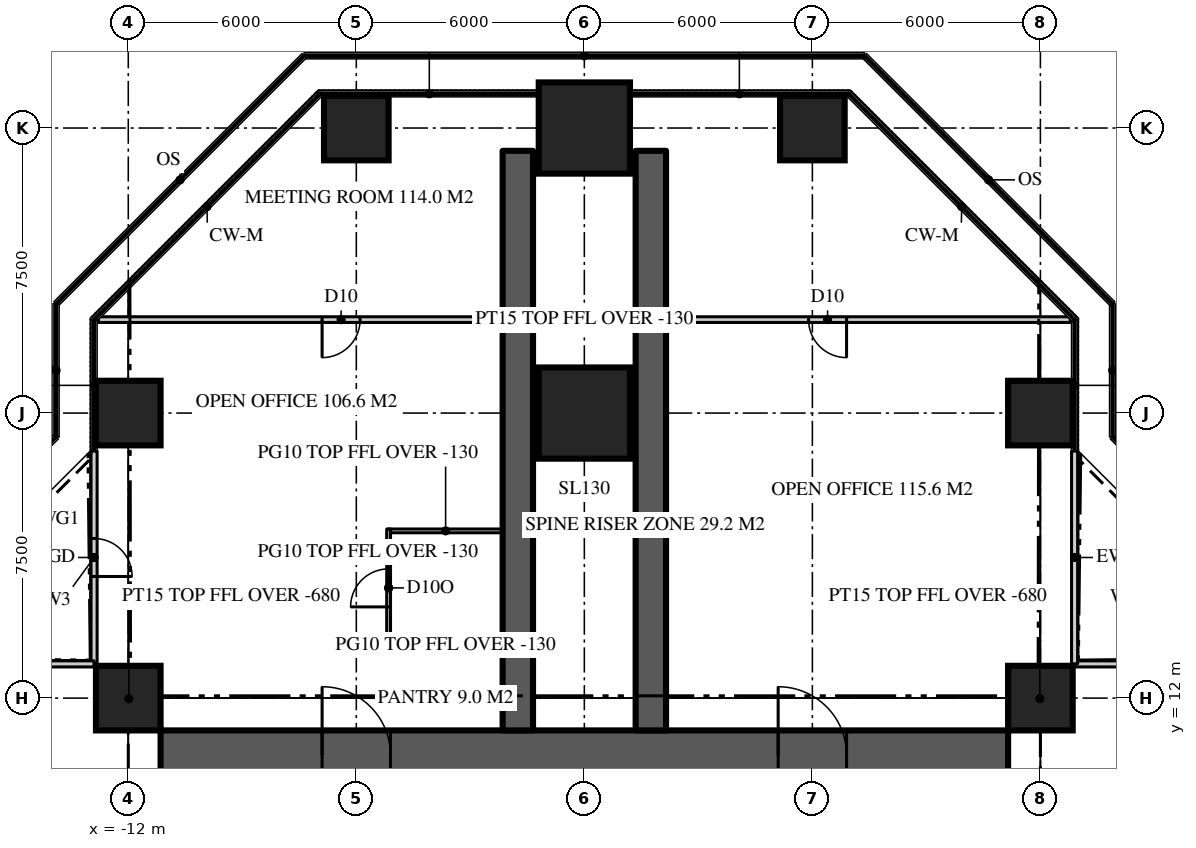
"""IFC4 building model, lengths in metres.
Left out: names, types, materials, properties, quantities, classifications, styles, units other than length and angle.
Written with IfcOpenShell. Run it as: python <this file> out.ifc"""

import sys

from ifc_helpers import new_model, si_unit, direction, frame, frame_2d, origin, origin_2d, place, context, subcontext, project, spatial, rectangle, extrude, element, fill, save


model = new_model("IFC4")
c1 = context("Model", 3, precision=1e-05, world=origin(), true_north=direction((0.0, 1.0)))
c2 = subcontext(c1, "Body", "Model", "MODEL_VIEW")
j1 = project(units=[si_unit("LENGTHUNIT", "METRE"), si_unit("PLANEANGLEUNIT", "RADIAN")], contexts=[c1])
p1 = place(None, origin())
s1 = spatial("IfcSite", under=j1, at=p1, CompositionType="ELEMENT")
p2 = place(p1, origin())
s2 = spatial("IfcBuilding", under=s1, at=p2, CompositionType="ELEMENT")
p3 = place(p2, frame((0.0, 0.0, 159.3)))
s3 = spatial("IfcBuildingStorey", under=s2, at=p3, CompositionType="ELEMENT", Elevation=159.3)
p4 = place(p3, frame((-11.15, 10.5, 0.0), z_axis=(0.0, 0.0, 1.0), x_axis=(1.0, 0.0, 0.0)))
e1 = element("IfcWall", 1, at=p4, inside=s3, PredefinedType="SHEAR", context=c2, shape_type="SweptSolid", body=[
    extrude(rectangle(XDim=22.3, YDim=1.3, at=frame_2d((11.15, 0.0))), origin(), (0.0, 0.0, 1.0), 3.9),
])
p5 = place(p4, frame((4.25, 0.0, 0.0)))
e2 = element("IfcOpeningElement", 2, at=p5, cuts=e1, PredefinedType="OPENING", context=c2, shape_type="SweptSolid", body=[
    extrude(rectangle(XDim=1.8, YDim=2.2, at=frame_2d((0.9, 1.1))), frame((0.0, 0.66, 0.0), z_axis=(0.0, -1.0, 0.0), x_axis=(1.0, 0.0, 0.0)), (0.0, 0.0, 1.0), 1.32),
])
p6 = place(p4, frame((16.25, 0.0, 0.0)))
e3 = element("IfcOpeningElement", 3, at=p6, cuts=e1, PredefinedType="OPENING", context=c2, shape_type="SweptSolid", body=[
    extrude(rectangle(XDim=1.8, YDim=2.2, at=frame_2d((0.9, 1.1))), frame((0.0, 0.66, 0.0), z_axis=(0.0, -1.0, 0.0), x_axis=(1.0, 0.0, 0.0)), (0.0, 0.0, 1.0), 1.32),
])
for number, where, z_axis, x_axis in (
    (4, (1.75, 11.15, 0.0), (0.0, 0.0, 1.0), (0.0, 1.0, 0.0)),
    (5, (-1.75, 11.15, 0.0), (0.0, 0.0, 1.0), (0.0, 1.0, 0.0)),
):
    element("IfcWall", number, at=place(p3, frame(where, z_axis=z_axis, x_axis=x_axis)), inside=s3, PredefinedType="SHEAR", context=c2, shape_type="SweptSolid", body=[
        extrude(rectangle(XDim=15.25, YDim=0.8, at=frame_2d((7.625, 0.0))), origin(), (0.0, 0.0, 1.0), 3.9),
    ])
for number, where, z_axis, x_axis in (
    (6, (-12.0, 12.0, 0.0), (0.0, 0.0, 1.0), (1.0, 0.0, 0.0)),
    (7, (12.0, 12.0, 0.0), (0.0, 0.0, 1.0), (1.0, 0.0, 0.0)),
    (8, (-12.0, 19.5, 0.0), (0.0, 0.0, 1.0), (1.0, 0.0, 0.0)),
):
    element("IfcColumn", number, at=place(p3, frame(where, z_axis=z_axis, x_axis=x_axis)), inside=s3, PredefinedType="COLUMN", context=c2, shape_type="SweptSolid", body=[
        extrude(rectangle(XDim=1.7, YDim=1.7, at=origin_2d()), origin(), (0.0, 0.0, 1.0), 3.9),
    ])
p7 = place(p3, frame((0.0, 19.5, 0.0), z_axis=(0.0, 0.0, 1.0), x_axis=(1.0, 0.0, 0.0)))
e9 = element("IfcColumn", 9, at=p7, inside=s3, PredefinedType="COLUMN", context=c2, shape_type="SweptSolid", body=[
    extrude(rectangle(XDim=2.4, YDim=2.4, at=origin_2d()), origin(), (0.0, 0.0, 1.0), 3.9),
])
for number, where, z_axis, x_axis in (
    (10, (12.0, 19.5, 0.0), (0.0, 0.0, 1.0), (1.0, 0.0, 0.0)),
    (11, (-6.0, 27.0, 0.0), (0.0, 0.0, 1.0), (1.0, 0.0, 0.0)),
):
    element("IfcColumn", number, at=place(p3, frame(where, z_axis=z_axis, x_axis=x_axis)), inside=s3, PredefinedType="COLUMN", context=c2, shape_type="SweptSolid", body=[
        extrude(rectangle(XDim=1.7, YDim=1.7, at=origin_2d()), origin(), (0.0, 0.0, 1.0), 3.9),
    ])
p8 = place(p3, frame((0.0, 27.0, 0.0), z_axis=(0.0, 0.0, 1.0), x_axis=(1.0, 0.0, 0.0)))
e12 = element("IfcColumn", 12, at=p8, inside=s3, PredefinedType="COLUMN", context=c2, shape_type="SweptSolid", body=[
    extrude(rectangle(XDim=2.4, YDim=2.4, at=origin_2d()), origin(), (0.0, 0.0, 1.0), 3.9),
])
p9 = place(p3, frame((6.0, 27.0, 0.0), z_axis=(0.0, 0.0, 1.0), x_axis=(1.0, 0.0, 0.0)))
e13 = element("IfcColumn", 13, at=p9, inside=s3, PredefinedType="COLUMN", context=c2, shape_type="SweptSolid", body=[
    extrude(rectangle(XDim=1.7, YDim=1.7, at=origin_2d()), origin(), (0.0, 0.0, 1.0), 3.9),
])
p10 = place(p3, frame((18.5, 12.9, 0.0), z_axis=(0.0, 0.0, 1.0), x_axis=(-1.0, 0.0, 0.0)))
e14 = element("IfcWall", 14, at=p10, inside=s3, PredefinedType="SOLIDWALL", context=c2, shape_type="SweptSolid", body=[
    extrude(rectangle(XDim=5.6, YDim=0.16, at=frame_2d((2.8, 0.0))), origin(), (0.0, 0.0, 1.0), 3.77),
])
p11 = place(p10, frame((2.3, 0.0, 0.0)))
e15 = element("IfcOpeningElement", 15, at=p11, cuts=e14, PredefinedType="OPENING", context=c2, shape_type="SweptSolid", body=[
    extrude(rectangle(XDim=1.0, YDim=2.2, at=frame_2d((0.5, 1.1))), frame((0.0, 0.09, 0.0), z_axis=(0.0, -1.0, 0.0), x_axis=(1.0, 0.0, 0.0)), (0.0, 0.0, 1.0), 0.18),
])
p12 = place(p3, frame((12.9, 12.9, 0.0), z_axis=(0.0, 0.0, 1.0), x_axis=(0.0, 1.0, 0.0)))
e16 = element("IfcWall", 16, at=p12, inside=s3, PredefinedType="SOLIDWALL", context=c2, shape_type="SweptSolid", body=[
    extrude(rectangle(XDim=5.6, YDim=0.16, at=frame_2d((2.8, 0.0))), origin(), (0.0, 0.0, 1.0), 3.77),
])
p13 = place(p3, frame((-12.9, 18.5, 0.0), z_axis=(0.0, 0.0, 1.0), x_axis=(0.0, -1.0, 0.0)))
e17 = element("IfcWall", 17, at=p13, inside=s3, PredefinedType="SOLIDWALL", context=c2, shape_type="SweptSolid", body=[
    extrude(rectangle(XDim=5.6, YDim=0.16, at=frame_2d((2.8, 0.0))), origin(), (0.0, 0.0, 1.0), 3.77),
])
p14 = place(p13, frame((2.3, 0.0, 0.0)))
e18 = element("IfcOpeningElement", 18, at=p14, cuts=e17, PredefinedType="OPENING", context=c2, shape_type="SweptSolid", body=[
    extrude(rectangle(XDim=1.0, YDim=2.2, at=frame_2d((0.5, 1.1))), frame((0.0, 0.09, 0.0), z_axis=(0.0, -1.0, 0.0), x_axis=(1.0, 0.0, 0.0)), (0.0, 0.0, 1.0), 0.18),
])
p15 = place(p3, frame((-12.9, 12.9, 0.0), z_axis=(0.0, 0.0, 1.0), x_axis=(-1.0, 0.0, 0.0)))
e19 = element("IfcWall", 19, at=p15, inside=s3, PredefinedType="SOLIDWALL", context=c2, shape_type="SweptSolid", body=[
    extrude(rectangle(XDim=5.6, YDim=0.16, at=frame_2d((2.8, 0.0))), origin(), (0.0, 0.0, 1.0), 3.77),
])
p16 = place(p3, frame((12.786, 21.959, 0.0), z_axis=(0.0, 0.0, 1.0), x_axis=(-1.0, 0.0, 0.0)))
e20 = element("IfcWall", 20, at=p16, inside=s3, PredefinedType="PARTITIONING", context=c2, shape_type="SweptSolid", body=[
    extrude(rectangle(XDim=25.573, YDim=0.15, at=frame_2d((12.786, 0.0))), origin(), (0.0, 0.0, 1.0), 3.77),
])
p17 = place(p16, frame((18.687, 0.0, 0.0)))
e21 = element("IfcOpeningElement", 21, at=p17, cuts=e20, PredefinedType="OPENING", context=c2, shape_type="SweptSolid", body=[
    extrude(rectangle(XDim=1.0, YDim=2.2, at=frame_2d((0.5, 1.1))), frame((0.0, 0.085, 0.0), z_axis=(0.0, -1.0, 0.0), x_axis=(1.0, 0.0, 0.0)), (0.0, 0.0, 1.0), 0.17),
])
p18 = place(p16, frame((5.886, 0.0, 0.0)))
e22 = element("IfcOpeningElement", 22, at=p18, cuts=e20, PredefinedType="OPENING", context=c2, shape_type="SweptSolid", body=[
    extrude(rectangle(XDim=1.0, YDim=2.2, at=frame_2d((0.5, 1.1))), frame((0.0, 0.085, 0.0), z_axis=(0.0, -1.0, 0.0), x_axis=(1.0, 0.0, 0.0)), (0.0, 0.0, 1.0), 0.17),
])
for number, where, z_axis, x_axis in (
    (23, (-2.15, 13.4, 0.0), (0.0, 0.0, 1.0), (-1.0, 0.0, 0.0)),
    (24, (-2.15, 16.4, 0.0), (0.0, 0.0, 1.0), (-1.0, 0.0, 0.0)),
):
    element("IfcWall", number, at=place(p3, frame(where, z_axis=z_axis, x_axis=x_axis)), inside=s3, PredefinedType="PARTITIONING", context=c2, shape_type="SweptSolid", body=[
        extrude(rectangle(XDim=3.0, YDim=0.1, at=frame_2d((1.5, 0.0))), origin(), (0.0, 0.0, 1.0), 3.77),
    ])
p19 = place(p3, frame((-5.15, 13.35, 0.0), z_axis=(0.0, 0.0, 1.0), x_axis=(0.0, 1.0, 0.0)))
e25 = element("IfcWall", 25, at=p19, inside=s3, PredefinedType="PARTITIONING", context=c2, shape_type="SweptSolid", body=[
    extrude(rectangle(XDim=3.1, YDim=0.1, at=frame_2d((1.55, 0.0))), origin(), (0.0, 0.0, 1.0), 3.77),
])
p20 = place(p19, frame((1.05, 0.0, 0.0)))
e26 = element("IfcOpeningElement", 26, at=p20, cuts=e25, PredefinedType="OPENING", context=c2, shape_type="SweptSolid", body=[
    extrude(rectangle(XDim=1.0, YDim=2.2, at=frame_2d((0.5, 1.1))), frame((0.0, 0.06, 0.0), z_axis=(0.0, -1.0, 0.0), x_axis=(1.0, 0.0, 0.0)), (0.0, 0.0, 1.0), 0.12),
])
for number, where, z_axis, x_axis in (
    (27, (11.15, 11.15, 0.0), (0.0, 0.0, 1.0), (0.707, 0.707, 0.0)),
    (28, (-11.15, 11.15, 0.0), (0.0, 0.0, 1.0), (-0.707, 0.707, 0.0)),
):
    element("IfcWall", number, at=place(p3, frame(where, z_axis=z_axis, x_axis=x_axis)), inside=s3, PredefinedType="PARTITIONING", context=c2, shape_type="SweptSolid", body=[
        extrude(rectangle(XDim=2.362, YDim=0.15, at=frame_2d((1.181, 0.0))), origin(), (0.0, 0.0, 1.0), 3.22),
    ])
p21 = place(p14, origin())
e29 = element("IfcDoor", 29, at=p21, inside=s3, OperationType="SINGLE_SWING_RIGHT", PredefinedType="DOOR", context=c2, shape_type="SweptSolid", body=[
    extrude(rectangle(XDim=1.0, YDim=2.2, at=frame_2d((0.5, 1.1))), frame((0.0, 0.025, 0.0), z_axis=(0.0, -1.0, 0.0), x_axis=(1.0, 0.0, 0.0)), (0.0, 0.0, 1.0), 0.05),
])
fill(e18, e29)
p22 = place(p5, origin())
e30 = element("IfcDoor", 30, at=p22, inside=s3, OperationType="DOUBLE_DOOR_DOUBLE_SWING", PredefinedType="DOOR", context=c2, shape_type="SweptSolid", body=[
    extrude(rectangle(XDim=1.8, YDim=2.2, at=frame_2d((0.9, 1.1))), frame((0.0, 0.025, 0.0), z_axis=(0.0, -1.0, 0.0), x_axis=(1.0, 0.0, 0.0)), (0.0, 0.0, 1.0), 0.05),
])
fill(e2, e30)
p23 = place(p6, origin())
e31 = element("IfcDoor", 31, at=p23, inside=s3, OperationType="DOUBLE_DOOR_DOUBLE_SWING", PredefinedType="DOOR", context=c2, shape_type="SweptSolid", body=[
    extrude(rectangle(XDim=1.8, YDim=2.2, at=frame_2d((0.9, 1.1))), frame((0.0, 0.025, 0.0), z_axis=(0.0, -1.0, 0.0), x_axis=(1.0, 0.0, 0.0)), (0.0, 0.0, 1.0), 0.05),
])
fill(e3, e31)
p24 = place(p17, origin())
e32 = element("IfcDoor", 32, at=p24, inside=s3, OperationType="SINGLE_SWING_RIGHT", PredefinedType="DOOR", context=c2, shape_type="SweptSolid", body=[
    extrude(rectangle(XDim=1.0, YDim=2.2, at=frame_2d((0.5, 1.1))), frame((0.0, 0.025, 0.0), z_axis=(0.0, -1.0, 0.0), x_axis=(1.0, 0.0, 0.0)), (0.0, 0.0, 1.0), 0.05),
])
fill(e21, e32)
p25 = place(p18, origin())
e33 = element("IfcDoor", 33, at=p25, inside=s3, OperationType="SINGLE_SWING_LEFT", PredefinedType="DOOR", context=c2, shape_type="SweptSolid", body=[
    extrude(rectangle(XDim=1.0, YDim=2.2, at=frame_2d((0.5, 1.1))), frame((0.0, 0.025, 0.0), z_axis=(0.0, -1.0, 0.0), x_axis=(1.0, 0.0, 0.0)), (0.0, 0.0, 1.0), 0.05),
])
fill(e22, e33)
p26 = place(p20, origin())
e34 = element("IfcDoor", 34, at=p26, inside=s3, OperationType="SINGLE_SWING_LEFT", PredefinedType="DOOR", context=c2, shape_type="SweptSolid", body=[
    extrude(rectangle(XDim=1.0, YDim=2.2, at=frame_2d((0.5, 1.1))), frame((0.0, 0.025, 0.0), z_axis=(0.0, -1.0, 0.0), x_axis=(1.0, 0.0, 0.0)), (0.0, 0.0, 1.0), 0.05),
])
fill(e26, e34)
save(model, sys.argv[1])
